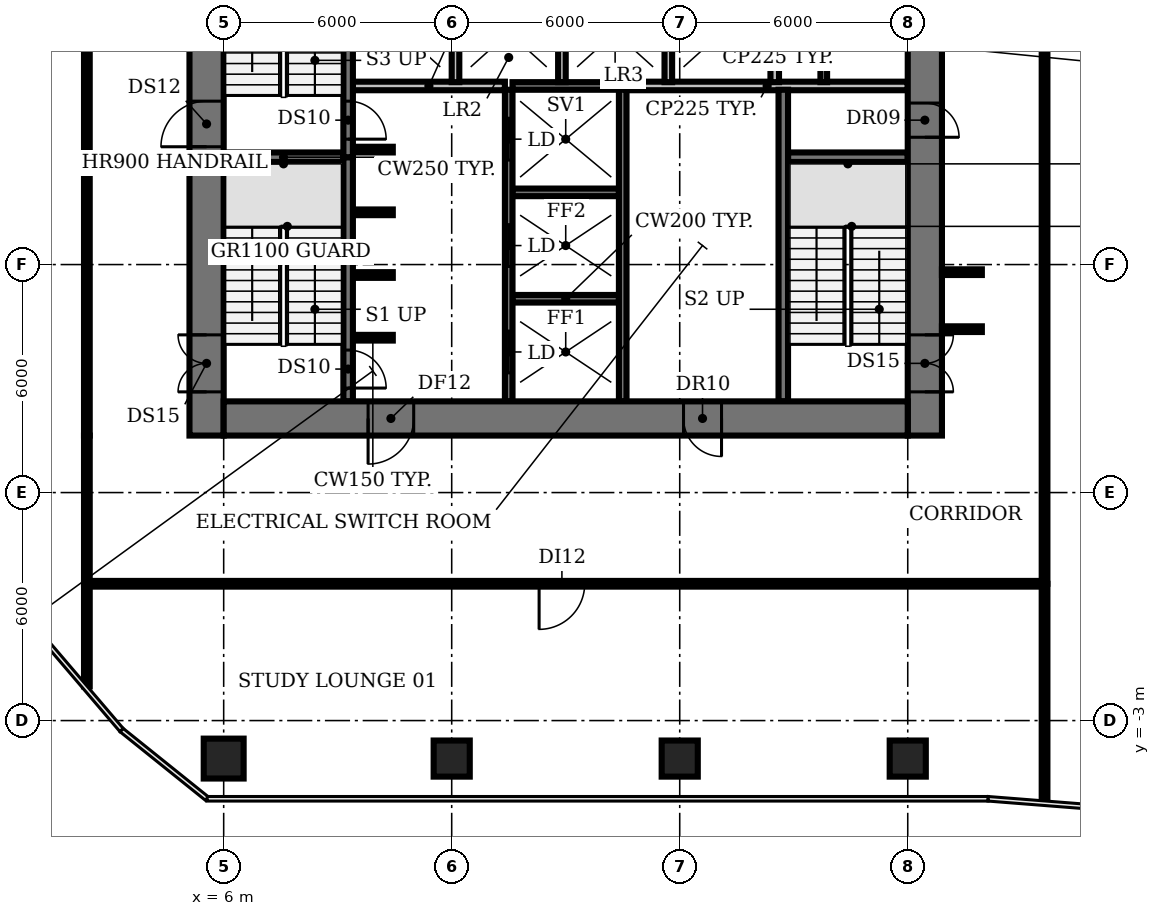
"""IFC4 building model, lengths in metres.
Left out: names, types, materials, properties, quantities, classifications, styles, units other than length and angle.
Written with IfcOpenShell. Run it as: python <this file> out.ifc"""

import sys

from ifc_helpers import new_model, si_unit, direction, frame, frame_2d, origin, origin_2d, place, context, subcontext, project, spatial, rectangle, circle, extrude, element, fill, save


model = new_model("IFC4")
c1 = context("Model", 3, precision=1e-05, world=origin(), true_north=direction((0.0, 1.0)))
c2 = subcontext(c1, "Body", "Model", "MODEL_VIEW")
j1 = project(units=[si_unit("LENGTHUNIT", "METRE"), si_unit("PLANEANGLEUNIT", "RADIAN")], contexts=[c1])
p1 = place(None, origin())
s1 = spatial("IfcSite", under=j1, at=p1, CompositionType="ELEMENT")
p2 = place(p1, origin())
s2 = spatial("IfcBuilding", under=s1, at=p2, CompositionType="ELEMENT")
p3 = place(p2, frame((0.0, 0.0, 33.2)))
s3 = spatial("IfcBuildingStorey", under=s2, at=p3, CompositionType="ELEMENT", Elevation=33.2)
p4 = place(p3, frame((6.0, -4.0, 0.0), z_axis=(0.0, 0.0, 1.0), x_axis=(1.0, 0.0, 0.0)))
e1 = element("IfcColumn", 1, at=p4, inside=s3, PredefinedType="COLUMN", context=c2, shape_type="SweptSolid", body=[
    extrude(circle(Radius=0.525, at=origin_2d()), origin(), (0.0, 0.0, 1.0), 3.85),
])
for number, where, z_axis, x_axis in (
    (2, (12.0, -4.0, 0.0), (0.0, 0.0, 1.0), (1.0, 0.0, 0.0)),
    (3, (18.0, -4.0, 0.0), (0.0, 0.0, 1.0), (1.0, 0.0, 0.0)),
    (4, (24.0, -4.0, 0.0), (0.0, 0.0, 1.0), (1.0, 0.0, 0.0)),
):
    element("IfcColumn", number, at=place(p3, frame(where, z_axis=z_axis, x_axis=x_axis)), inside=s3, PredefinedType="COLUMN", context=c2, shape_type="SweptSolid", body=[
        extrude(rectangle(XDim=0.95, YDim=0.95, at=origin_2d()), origin(), (0.0, 0.0, 1.0), 3.85),
    ])
p5 = place(p3, frame((9.4, 7.075, 0.0), z_axis=(0.0, 0.0, 1.0), x_axis=(1.0, 0.0, 0.0)))
e5 = element("IfcWall", 5, at=p5, inside=s3, PredefinedType="SHEAR", context=c2, shape_type="SweptSolid", body=[
    extrude(rectangle(XDim=1.05, YDim=0.15, at=frame_2d((0.525, 0.0))), origin(), (0.0, 0.0, 1.0), 3.85),
])
p6 = place(p3, frame((13.6, 8.1, 0.0), z_axis=(0.0, 0.0, 1.0), x_axis=(1.0, 0.0, 0.0)))
e6 = element("IfcWall", 6, at=p6, inside=s3, PredefinedType="SHEAR", context=c2, shape_type="SweptSolid", body=[
    extrude(rectangle(XDim=2.8, YDim=0.2, at=frame_2d((1.4, 0.0))), origin(), (0.0, 0.0, 1.0), 3.85),
])
for number, where, z_axis, x_axis in (
    (7, (9.4, 8.725, 0.0), (0.0, 0.0, 1.0), (1.0, 0.0, 0.0)),
    (8, (9.4, 10.375, 0.0), (0.0, 0.0, 1.0), (1.0, 0.0, 0.0)),
):
    element("IfcWall", number, at=place(p3, frame(where, z_axis=z_axis, x_axis=x_axis)), inside=s3, PredefinedType="SHEAR", context=c2, shape_type="SweptSolid", body=[
        extrude(rectangle(XDim=1.05, YDim=0.15, at=frame_2d((0.525, 0.0))), origin(), (0.0, 0.0, 1.0), 3.85),
    ])
p7 = place(p3, frame((13.6, 10.9, 0.0), z_axis=(0.0, 0.0, 1.0), x_axis=(1.0, 0.0, 0.0)))
e9 = element("IfcWall", 9, at=p7, inside=s3, PredefinedType="SHEAR", context=c2, shape_type="SweptSolid", body=[
    extrude(rectangle(XDim=2.8, YDim=0.2, at=frame_2d((1.4, 0.0))), origin(), (0.0, 0.0, 1.0), 3.85),
])
for number, where, z_axis, x_axis in (
    (10, (6.0, 11.825, 0.0), (0.0, 0.0, 1.0), (1.0, 0.0, 0.0)),
    (11, (20.85, 11.825, 0.0), (0.0, 0.0, 1.0), (1.0, 0.0, 0.0)),
):
    element("IfcWall", number, at=place(p3, frame(where, z_axis=z_axis, x_axis=x_axis)), inside=s3, PredefinedType="SHEAR", context=c2, shape_type="SweptSolid", body=[
        extrude(rectangle(XDim=3.15, YDim=0.25, at=frame_2d((1.575, 0.0))), origin(), (0.0, 0.0, 1.0), 3.85),
    ])
p8 = place(p3, frame((9.4, 12.025, 0.0), z_axis=(0.0, 0.0, 1.0), x_axis=(1.0, 0.0, 0.0)))
e12 = element("IfcWall", 12, at=p8, inside=s3, PredefinedType="SHEAR", context=c2, shape_type="SweptSolid", body=[
    extrude(rectangle(XDim=1.05, YDim=0.15, at=frame_2d((0.525, 0.0))), origin(), (0.0, 0.0, 1.0), 3.85),
])
p9 = place(p3, frame((9.4, 13.7, 0.0), z_axis=(0.0, 0.0, 1.0), x_axis=(1.0, 0.0, 0.0)))
e13 = element("IfcWall", 13, at=p9, inside=s3, PredefinedType="PARTITIONING", context=c2, shape_type="SweptSolid", body=[
    extrude(rectangle(XDim=4.0, YDim=0.225, at=frame_2d((2.0, 0.0))), origin(), (0.0, 0.0, 1.0), 3.85),
])
p10 = place(p3, frame((13.6, 13.7, 0.0), z_axis=(0.0, 0.0, 1.0), x_axis=(1.0, 0.0, 0.0)))
e14 = element("IfcWall", 14, at=p10, inside=s3, PredefinedType="SHEAR", context=c2, shape_type="SweptSolid", body=[
    extrude(rectangle(XDim=2.8, YDim=0.2, at=frame_2d((1.4, 0.0))), origin(), (0.0, 0.0, 1.0), 3.85),
])
p11 = place(p3, frame((16.6, 13.7, 0.0), z_axis=(0.0, 0.0, 1.0), x_axis=(1.0, 0.0, 0.0)))
e15 = element("IfcWall", 15, at=p11, inside=s3, PredefinedType="PARTITIONING", context=c2, shape_type="SweptSolid", body=[
    extrude(rectangle(XDim=7.4, YDim=0.225, at=frame_2d((3.7, 0.0))), origin(), (0.0, 0.0, 1.0), 3.85),
])
p12 = place(p3, frame((9.275, 11.825, 0.0), z_axis=(0.0, 0.0, 1.0), x_axis=(0.0, -1.0, 0.0)))
e16 = element("IfcWall", 16, at=p12, inside=s3, PredefinedType="SHEAR", context=c2, shape_type="SweptSolid", body=[
    extrude(rectangle(XDim=6.425, YDim=0.25, at=frame_2d((3.212, 0.0))), origin(), (0.0, 0.0, 1.0), 3.85),
])
p13 = place(p12, frame((5.075, 0.0, 0.0)))
e17 = element("IfcOpeningElement", 17, at=p13, cuts=e16, PredefinedType="OPENING", context=c2, shape_type="SweptSolid", body=[
    extrude(rectangle(XDim=1.0, YDim=2.1, at=frame_2d((0.5, 1.05))), frame((0.0, 0.135, 0.0), z_axis=(0.0, -1.0, 0.0), x_axis=(1.0, 0.0, 0.0)), (0.0, 0.0, 1.0), 0.27),
])
p14 = place(p3, frame((9.275, 18.375, 0.0), z_axis=(0.0, 0.0, 1.0), x_axis=(0.0, -1.0, 0.0)))
e18 = element("IfcWall", 18, at=p14, inside=s3, PredefinedType="SHEAR", context=c2, shape_type="SweptSolid", body=[
    extrude(rectangle(XDim=6.55, YDim=0.25, at=frame_2d((3.275, 0.0))), origin(), (0.0, 0.0, 1.0), 3.85),
])
p15 = place(p14, frame((5.075, 0.0, 0.0)))
e19 = element("IfcOpeningElement", 19, at=p15, cuts=e18, PredefinedType="OPENING", context=c2, shape_type="SweptSolid", body=[
    extrude(rectangle(XDim=1.0, YDim=2.1, at=frame_2d((0.5, 1.05))), frame((0.0, 0.135, 0.0), z_axis=(0.0, -1.0, 0.0), x_axis=(1.0, 0.0, 0.0)), (0.0, 0.0, 1.0), 0.27),
])
p16 = place(p3, frame((12.1, 13.8, 0.0), z_axis=(0.0, 0.0, 1.0), x_axis=(0.0, 1.0, 0.0)))
e20 = element("IfcWall", 20, at=p16, inside=s3, PredefinedType="SOLIDWALL", context=c2, shape_type="SweptSolid", body=[
    extrude(rectangle(XDim=2.6, YDim=0.2, at=frame_2d((1.3, 0.0))), origin(), (0.0, 0.0, 1.0), 3.85),
])
p17 = place(p3, frame((13.5, 5.4, 0.0), z_axis=(0.0, 0.0, 1.0), x_axis=(0.0, 1.0, 0.0)))
e21 = element("IfcWall", 21, at=p17, inside=s3, PredefinedType="SHEAR", context=c2, shape_type="SweptSolid", body=[
    extrude(rectangle(XDim=8.2, YDim=0.2, at=frame_2d((4.1, 0.0))), origin(), (0.0, 0.0, 1.0), 3.85),
])
p18 = place(p17, frame((0.75, 0.0, 0.0)))
e22 = element("IfcOpeningElement", 22, at=p18, cuts=e21, PredefinedType="OPENING", context=c2, shape_type="SweptSolid", body=[
    extrude(rectangle(XDim=1.1, YDim=2.1, at=frame_2d((0.55, 1.05))), frame((0.0, 0.11, 0.0), z_axis=(0.0, -1.0, 0.0), x_axis=(1.0, 0.0, 0.0)), (0.0, 0.0, 1.0), 0.22),
])
p19 = place(p17, frame((3.55, 0.0, 0.0)))
e23 = element("IfcOpeningElement", 23, at=p19, cuts=e21, PredefinedType="OPENING", context=c2, shape_type="SweptSolid", body=[
    extrude(rectangle(XDim=1.1, YDim=2.1, at=frame_2d((0.55, 1.05))), frame((0.0, 0.11, 0.0), z_axis=(0.0, -1.0, 0.0), x_axis=(1.0, 0.0, 0.0)), (0.0, 0.0, 1.0), 0.22),
])
p20 = place(p17, frame((6.35, 0.0, 0.0)))
e24 = element("IfcOpeningElement", 24, at=p20, cuts=e21, PredefinedType="OPENING", context=c2, shape_type="SweptSolid", body=[
    extrude(rectangle(XDim=1.1, YDim=2.1, at=frame_2d((0.55, 1.05))), frame((0.0, 0.11, 0.0), z_axis=(0.0, -1.0, 0.0), x_axis=(1.0, 0.0, 0.0)), (0.0, 0.0, 1.0), 0.22),
])
p21 = place(p3, frame((14.9, 13.8, 0.0), z_axis=(0.0, 0.0, 1.0), x_axis=(0.0, 1.0, 0.0)))
e25 = element("IfcWall", 25, at=p21, inside=s3, PredefinedType="SOLIDWALL", context=c2, shape_type="SweptSolid", body=[
    extrude(rectangle(XDim=2.6, YDim=0.2, at=frame_2d((1.3, 0.0))), origin(), (0.0, 0.0, 1.0), 3.85),
])
p22 = place(p3, frame((16.5, 5.4, 0.0), z_axis=(0.0, 0.0, 1.0), x_axis=(0.0, 1.0, 0.0)))
e26 = element("IfcWall", 26, at=p22, inside=s3, PredefinedType="SHEAR", context=c2, shape_type="SweptSolid", body=[
    extrude(rectangle(XDim=8.2, YDim=0.2, at=frame_2d((4.1, 0.0))), origin(), (0.0, 0.0, 1.0), 3.85),
])
p23 = place(p3, frame((17.7, 13.8, 0.0), z_axis=(0.0, 0.0, 1.0), x_axis=(0.0, 1.0, 0.0)))
e27 = element("IfcWall", 27, at=p23, inside=s3, PredefinedType="SOLIDWALL", context=c2, shape_type="SweptSolid", body=[
    extrude(rectangle(XDim=2.6, YDim=0.2, at=frame_2d((1.3, 0.0))), origin(), (0.0, 0.0, 1.0), 3.85),
])
p24 = place(p3, frame((20.5, 13.8, 0.0), z_axis=(0.0, 0.0, 1.0), x_axis=(0.0, 1.0, 0.0)))
e28 = element("IfcWall", 28, at=p24, inside=s3, PredefinedType="PARTITIONING", context=c2, shape_type="SweptSolid", body=[
    extrude(rectangle(XDim=2.6, YDim=0.225, at=frame_2d((1.3, 0.0))), origin(), (0.0, 0.0, 1.0), 3.85),
])
p25 = place(p3, frame((20.725, 5.4, 0.0), z_axis=(0.0, 0.0, 1.0), x_axis=(0.0, 1.0, 0.0)))
e29 = element("IfcWall", 29, at=p25, inside=s3, PredefinedType="SHEAR", context=c2, shape_type="SweptSolid", body=[
    extrude(rectangle(XDim=8.2, YDim=0.25, at=frame_2d((4.1, 0.0))), origin(), (0.0, 0.0, 1.0), 3.85),
])
p26 = place(p3, frame((21.79, 13.8, 0.0), z_axis=(0.0, 0.0, 1.0), x_axis=(0.0, 1.0, 0.0)))
e30 = element("IfcWall", 30, at=p26, inside=s3, PredefinedType="PARTITIONING", context=c2, shape_type="SweptSolid", body=[
    extrude(rectangle(XDim=2.6, YDim=0.175, at=frame_2d((1.3, 0.0))), origin(), (0.0, 0.0, 1.0), 3.85),
])
p27 = place(p3, frame((5.55, 4.5, 0.0), z_axis=(0.0, 0.0, 1.0), x_axis=(0.0, 1.0, 0.0)))
e31 = element("IfcWall", 31, at=p27, inside=s3, PredefinedType="SHEAR", context=c2, shape_type="SweptSolid", body=[
    extrude(rectangle(XDim=21.2, YDim=0.9, at=frame_2d((10.6, 0.0))), origin(), (0.0, 0.0, 1.0), 3.85),
])
p28 = place(p27, frame((1.15, 0.0, 0.0)))
e32 = element("IfcOpeningElement", 32, at=p28, cuts=e31, PredefinedType="OPENING", context=c2, shape_type="SweptSolid", body=[
    extrude(rectangle(XDim=1.5, YDim=2.1, at=frame_2d((0.75, 1.05))), frame((0.0, 0.46, 0.0), z_axis=(0.0, -1.0, 0.0), x_axis=(1.0, 0.0, 0.0)), (0.0, 0.0, 1.0), 0.92),
])
p29 = place(p27, frame((7.6, 0.0, 0.0)))
e33 = element("IfcOpeningElement", 33, at=p29, cuts=e31, PredefinedType="OPENING", context=c2, shape_type="SweptSolid", body=[
    extrude(rectangle(XDim=1.2, YDim=2.1, at=frame_2d((0.6, 1.05))), frame((0.0, 0.46, 0.0), z_axis=(0.0, -1.0, 0.0), x_axis=(1.0, 0.0, 0.0)), (0.0, 0.0, 1.0), 0.92),
])
p30 = place(p27, frame((14.15, 0.0, 0.0)))
e34 = element("IfcOpeningElement", 34, at=p30, cuts=e31, PredefinedType="OPENING", context=c2, shape_type="SweptSolid", body=[
    extrude(rectangle(XDim=1.2, YDim=2.1, at=frame_2d((0.6, 1.05))), frame((0.0, 0.46, 0.0), z_axis=(0.0, -1.0, 0.0), x_axis=(1.0, 0.0, 0.0)), (0.0, 0.0, 1.0), 0.92),
])
p31 = place(p3, frame((24.45, 25.7, 0.0), z_axis=(0.0, 0.0, 1.0), x_axis=(0.0, -1.0, 0.0)))
e35 = element("IfcWall", 35, at=p31, inside=s3, PredefinedType="SHEAR", context=c2, shape_type="SweptSolid", body=[
    extrude(rectangle(XDim=21.2, YDim=0.9, at=frame_2d((10.6, 0.0))), origin(), (0.0, 0.0, 1.0), 3.85),
])
p32 = place(p31, frame((18.55, 0.0, 0.0)))
e36 = element("IfcOpeningElement", 36, at=p32, cuts=e35, PredefinedType="OPENING", context=c2, shape_type="SweptSolid", body=[
    extrude(rectangle(XDim=1.5, YDim=2.1, at=frame_2d((0.75, 1.05))), frame((0.0, 0.46, 0.0), z_axis=(0.0, -1.0, 0.0), x_axis=(1.0, 0.0, 0.0)), (0.0, 0.0, 1.0), 0.92),
])
p33 = place(p31, frame((12.45, 0.0, 0.0)))
e37 = element("IfcOpeningElement", 37, at=p33, cuts=e35, PredefinedType="OPENING", context=c2, shape_type="SweptSolid", body=[
    extrude(rectangle(XDim=0.9, YDim=2.1, at=frame_2d((0.45, 1.05))), frame((0.0, 0.46, 0.0), z_axis=(0.0, -1.0, 0.0), x_axis=(1.0, 0.0, 0.0)), (0.0, 0.0, 1.0), 0.92),
])
p34 = place(p31, frame((6.45, 0.0, 0.0)))
e38 = element("IfcOpeningElement", 38, at=p34, cuts=e35, PredefinedType="OPENING", context=c2, shape_type="SweptSolid", body=[
    extrude(rectangle(XDim=2.0, YDim=2.1, at=frame_2d((1.0, 1.05))), frame((0.0, 0.46, 0.0), z_axis=(0.0, -1.0, 0.0), x_axis=(1.0, 0.0, 0.0)), (0.0, 0.0, 1.0), 0.92),
])
p35 = place(p3, frame((24.0, 4.95, 0.0), z_axis=(0.0, 0.0, 1.0), x_axis=(-1.0, 0.0, 0.0)))
e39 = element("IfcWall", 39, at=p35, inside=s3, PredefinedType="SHEAR", context=c2, shape_type="SweptSolid", body=[
    extrude(rectangle(XDim=18.0, YDim=0.9, at=frame_2d((9.0, 0.0))), origin(), (0.0, 0.0, 1.0), 3.85),
])
p36 = place(p35, frame((13.0, 0.0, 0.0)))
e40 = element("IfcOpeningElement", 40, at=p36, cuts=e39, PredefinedType="OPENING", context=c2, shape_type="SweptSolid", body=[
    extrude(rectangle(XDim=1.2, YDim=2.1, at=frame_2d((0.6, 1.05))), frame((0.0, 0.46, 0.0), z_axis=(0.0, -1.0, 0.0), x_axis=(1.0, 0.0, 0.0)), (0.0, 0.0, 1.0), 0.92),
])
p37 = place(p35, frame((4.9, 0.0, 0.0)))
e41 = element("IfcOpeningElement", 41, at=p37, cuts=e39, PredefinedType="OPENING", context=c2, shape_type="SweptSolid", body=[
    extrude(rectangle(XDim=1.0, YDim=2.1, at=frame_2d((0.5, 1.05))), frame((0.0, 0.46, 0.0), z_axis=(0.0, -1.0, 0.0), x_axis=(1.0, 0.0, 0.0)), (0.0, 0.0, 1.0), 0.92),
])
p38 = place(p3, frame((2.4, -2.1, 0.0), z_axis=(0.0, 0.0, 1.0), x_axis=(0.0, 1.0, 0.0)))
e42 = element("IfcWall", 42, at=p38, inside=s3, PredefinedType="PARTITIONING", context=c2, shape_type="SweptSolid", body=[
    extrude(rectangle(XDim=2.7, YDim=0.15, at=frame_2d((1.35, 0.0))), origin(), (0.0, 0.0, 1.0), 2.83),
])
p39 = place(p3, frame((2.4, 0.6, 0.0), z_axis=(0.0, 0.0, 1.0), x_axis=(0.0, 1.0, 0.0)))
e43 = element("IfcWall", 43, at=p39, inside=s3, PredefinedType="PARTITIONING", context=c2, shape_type="SweptSolid", body=[
    extrude(rectangle(XDim=3.9, YDim=0.15, at=frame_2d((1.95, 0.0))), origin(), (0.0, 0.0, 1.0), 2.83),
])
p40 = place(p3, frame((2.4, 4.5, 0.0), z_axis=(0.0, 0.0, 1.0), x_axis=(0.0, 1.0, 0.0)))
e44 = element("IfcWall", 44, at=p40, inside=s3, PredefinedType="PARTITIONING", context=c2, shape_type="SweptSolid", body=[
    extrude(rectangle(XDim=21.2, YDim=0.15, at=frame_2d((10.6, 0.0))), origin(), (0.0, 0.0, 1.0), 2.83),
])
p41 = place(p40, frame((10.8, 0.0, 0.0)))
e45 = element("IfcOpeningElement", 45, at=p41, cuts=e44, PredefinedType="OPENING", context=c2, shape_type="SweptSolid", body=[
    extrude(rectangle(XDim=1.2, YDim=2.1, at=frame_2d((0.6, 1.05))), frame((0.0, 0.085, 0.0), z_axis=(0.0, -1.0, 0.0), x_axis=(1.0, 0.0, 0.0)), (0.0, 0.0, 1.0), 0.17),
])
for number, where, z_axis, x_axis in (
    (46, (24.9, 7.3, 0.0), (0.0, 0.0, 1.0), (1.0, 0.0, 0.0)),
    (47, (24.9, 8.8, 0.0), (0.0, 0.0, 1.0), (1.0, 0.0, 0.0)),
):
    element("IfcWall", number, at=place(p3, frame(where, z_axis=z_axis, x_axis=x_axis)), inside=s3, PredefinedType="PARTITIONING", context=c2, shape_type="SweptSolid", body=[
        extrude(rectangle(XDim=1.05, YDim=0.15, at=frame_2d((0.525, 0.0))), origin(), (0.0, 0.0, 1.0), 2.83),
    ])
p42 = place(p3, frame((27.6, -5.12, 0.0), z_axis=(0.0, 0.0, 1.0), x_axis=(0.0, 1.0, 0.0)))
e48 = element("IfcWall", 48, at=p42, inside=s3, PredefinedType="PARTITIONING", context=c2, shape_type="SweptSolid", body=[
    extrude(rectangle(XDim=5.72, YDim=0.15, at=frame_2d((2.86, 0.0))), origin(), (0.0, 0.0, 1.0), 2.83),
])
p43 = place(p3, frame((27.6, 0.6, 0.0), z_axis=(0.0, 0.0, 1.0), x_axis=(-1.0, 0.0, 0.0)))
e49 = element("IfcWall", 49, at=p43, inside=s3, PredefinedType="PARTITIONING", context=c2, shape_type="SweptSolid", body=[
    extrude(rectangle(XDim=25.2, YDim=0.15, at=frame_2d((12.6, 0.0))), origin(), (0.0, 0.0, 1.0), 2.83),
])
p44 = place(p43, frame((12.1, 0.0, 0.0)))
e50 = element("IfcOpeningElement", 50, at=p44, cuts=e49, PredefinedType="OPENING", context=c2, shape_type="SweptSolid", body=[
    extrude(rectangle(XDim=1.2, YDim=2.1, at=frame_2d((0.6, 1.05))), frame((0.0, 0.085, 0.0), z_axis=(0.0, -1.0, 0.0), x_axis=(1.0, 0.0, 0.0)), (0.0, 0.0, 1.0), 0.17),
])
p45 = place(p3, frame((27.6, 0.6, 0.0), z_axis=(0.0, 0.0, 1.0), x_axis=(0.0, 1.0, 0.0)))
e51 = element("IfcWall", 51, at=p45, inside=s3, PredefinedType="PARTITIONING", context=c2, shape_type="SweptSolid", body=[
    extrude(rectangle(XDim=14.4, YDim=0.15, at=frame_2d((7.2, 0.0))), origin(), (0.0, 0.0, 1.0), 2.83),
])
p46 = place(p13, origin())
e52 = element("IfcDoor", 52, at=p46, inside=s3, OperationType="SINGLE_SWING_RIGHT", PredefinedType="DOOR", context=c2, shape_type="SweptSolid", body=[
    extrude(rectangle(XDim=1.0, YDim=2.1, at=frame_2d((0.5, 1.05))), frame((0.0, 0.025, 0.0), z_axis=(0.0, -1.0, 0.0), x_axis=(1.0, 0.0, 0.0)), (0.0, 0.0, 1.0), 0.05),
])
fill(e17, e52)
p47 = place(p15, origin())
e53 = element("IfcDoor", 53, at=p47, inside=s3, OperationType="SINGLE_SWING_RIGHT", PredefinedType="DOOR", context=c2, shape_type="SweptSolid", body=[
    extrude(rectangle(XDim=1.0, YDim=2.1, at=frame_2d((0.5, 1.05))), frame((0.0, 0.025, 0.0), z_axis=(0.0, -1.0, 0.0), x_axis=(1.0, 0.0, 0.0)), (0.0, 0.0, 1.0), 0.05),
])
fill(e19, e53)
p48 = place(p18, origin())
e54 = element("IfcDoor", 54, at=p48, inside=s3, OperationType="DOUBLE_DOOR_SLIDING", PredefinedType="DOOR", context=c2, shape_type="SweptSolid", body=[
    extrude(rectangle(XDim=1.1, YDim=2.1, at=frame_2d((0.55, 1.05))), frame((0.0, 0.025, 0.0), z_axis=(0.0, -1.0, 0.0), x_axis=(1.0, 0.0, 0.0)), (0.0, 0.0, 1.0), 0.05),
])
fill(e22, e54)
p49 = place(p19, origin())
e55 = element("IfcDoor", 55, at=p49, inside=s3, OperationType="DOUBLE_DOOR_SLIDING", PredefinedType="DOOR", context=c2, shape_type="SweptSolid", body=[
    extrude(rectangle(XDim=1.1, YDim=2.1, at=frame_2d((0.55, 1.05))), frame((0.0, 0.025, 0.0), z_axis=(0.0, -1.0, 0.0), x_axis=(1.0, 0.0, 0.0)), (0.0, 0.0, 1.0), 0.05),
])
fill(e23, e55)
p50 = place(p20, origin())
e56 = element("IfcDoor", 56, at=p50, inside=s3, OperationType="DOUBLE_DOOR_SLIDING", PredefinedType="DOOR", context=c2, shape_type="SweptSolid", body=[
    extrude(rectangle(XDim=1.1, YDim=2.1, at=frame_2d((0.55, 1.05))), frame((0.0, 0.025, 0.0), z_axis=(0.0, -1.0, 0.0), x_axis=(1.0, 0.0, 0.0)), (0.0, 0.0, 1.0), 0.05),
])
fill(e24, e56)
p51 = place(p28, origin())
e57 = element("IfcDoor", 57, at=p51, inside=s3, OperationType="DOUBLE_DOOR_SINGLE_SWING", PredefinedType="DOOR", context=c2, shape_type="SweptSolid", body=[
    extrude(rectangle(XDim=1.5, YDim=2.1, at=frame_2d((0.75, 1.05))), frame((0.0, 0.025, 0.0), z_axis=(0.0, -1.0, 0.0), x_axis=(1.0, 0.0, 0.0)), (0.0, 0.0, 1.0), 0.05),
])
fill(e32, e57)
p52 = place(p29, origin())
e58 = element("IfcDoor", 58, at=p52, inside=s3, OperationType="SINGLE_SWING_LEFT", PredefinedType="DOOR", context=c2, shape_type="SweptSolid", body=[
    extrude(rectangle(XDim=1.2, YDim=2.1, at=frame_2d((0.6, 1.05))), frame((0.0, 0.025, 0.0), z_axis=(0.0, -1.0, 0.0), x_axis=(1.0, 0.0, 0.0)), (0.0, 0.0, 1.0), 0.05),
])
fill(e33, e58)
p53 = place(p32, origin())
e59 = element("IfcDoor", 59, at=p53, inside=s3, OperationType="DOUBLE_DOOR_SINGLE_SWING", PredefinedType="DOOR", context=c2, shape_type="SweptSolid", body=[
    extrude(rectangle(XDim=1.5, YDim=2.1, at=frame_2d((0.75, 1.05))), frame((0.0, 0.025, 0.0), z_axis=(0.0, -1.0, 0.0), x_axis=(1.0, 0.0, 0.0)), (0.0, 0.0, 1.0), 0.05),
])
fill(e36, e59)
p54 = place(p33, origin())
e60 = element("IfcDoor", 60, at=p54, inside=s3, OperationType="SINGLE_SWING_RIGHT", PredefinedType="DOOR", context=c2, shape_type="SweptSolid", body=[
    extrude(rectangle(XDim=0.9, YDim=2.1, at=frame_2d((0.45, 1.05))), frame((0.0, -0.39, 0.0), z_axis=(0.0, -1.0, 0.0), x_axis=(1.0, 0.0, 0.0)), (0.0, 0.0, 1.0), 0.05),
])
fill(e37, e60)
p55 = place(p36, origin())
e61 = element("IfcDoor", 61, at=p55, inside=s3, OperationType="SINGLE_SWING_RIGHT", PredefinedType="DOOR", context=c2, shape_type="SweptSolid", body=[
    extrude(rectangle(XDim=1.2, YDim=2.1, at=frame_2d((0.6, 1.05))), frame((0.0, 0.025, 0.0), z_axis=(0.0, -1.0, 0.0), x_axis=(1.0, 0.0, 0.0)), (0.0, 0.0, 1.0), 0.05),
])
fill(e40, e61)
p56 = place(p37, origin())
e62 = element("IfcDoor", 62, at=p56, inside=s3, OperationType="SINGLE_SWING_LEFT", PredefinedType="DOOR", context=c2, shape_type="SweptSolid", body=[
    extrude(rectangle(XDim=1.0, YDim=2.1, at=frame_2d((0.5, 1.05))), frame((0.0, -0.39, 0.0), z_axis=(0.0, -1.0, 0.0), x_axis=(1.0, 0.0, 0.0)), (0.0, 0.0, 1.0), 0.05),
])
fill(e41, e62)
p57 = place(p44, origin())
e63 = element("IfcDoor", 63, at=p57, inside=s3, OperationType="SINGLE_SWING_RIGHT", PredefinedType="DOOR", context=c2, shape_type="SweptSolid", body=[
    extrude(rectangle(XDim=1.2, YDim=2.1, at=frame_2d((0.6, 1.05))), frame((0.0, 0.025, 0.0), z_axis=(0.0, -1.0, 0.0), x_axis=(1.0, 0.0, 0.0)), (0.0, 0.0, 1.0), 0.05),
])
fill(e50, e63)
save(model, sys.argv[1])
